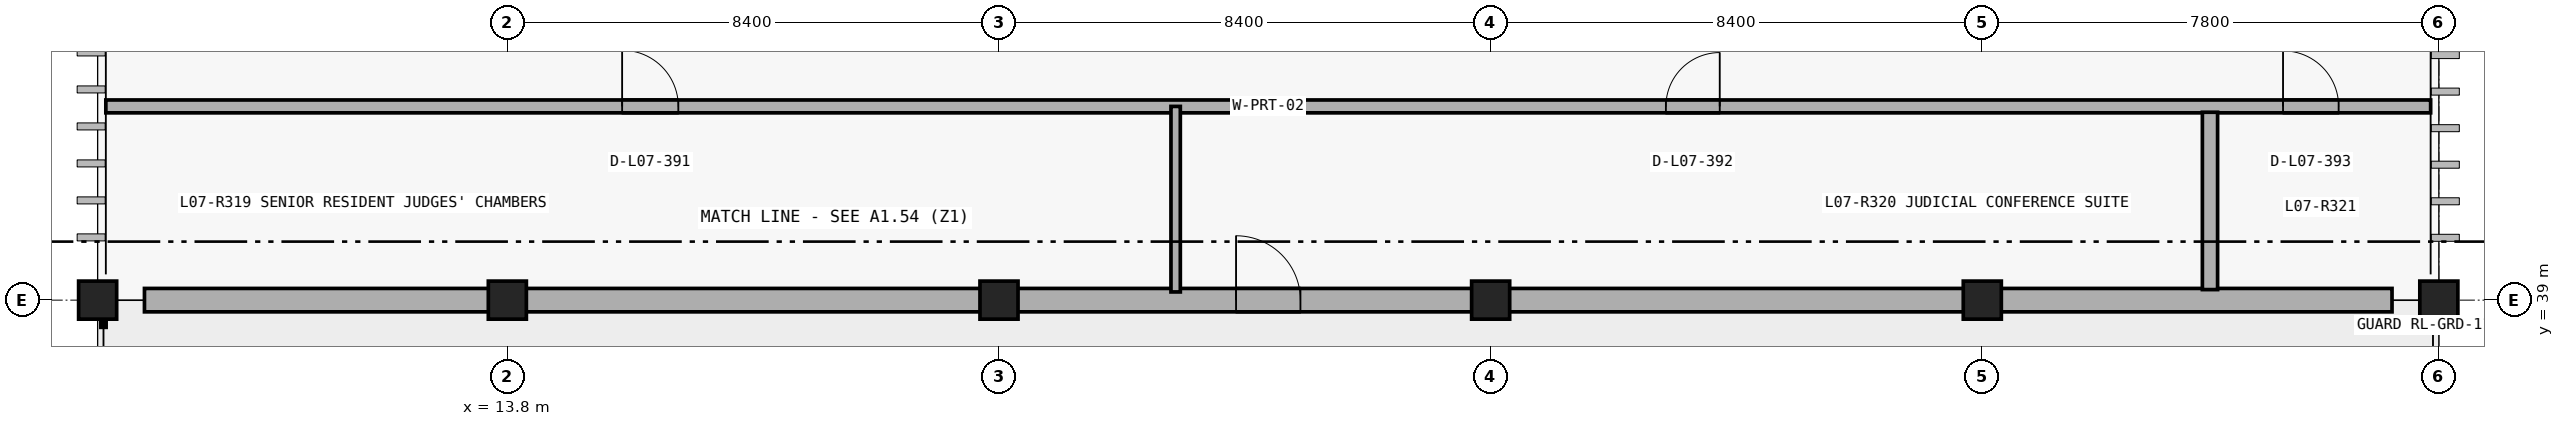
"""IFC4 building model, lengths in metres.
Left out: names, types, materials, properties, quantities, classifications, styles, units other than length and angle.
Written with IfcOpenShell. Run it as: python <this file> out.ifc"""

import sys

from ifc_helpers import new_model, si_unit, direction, frame, frame_2d, origin_with_axes, origin_2d_with_axis, place, context, subcontext, project, spatial, rectangle, circle, extrude, element, fill, save


model = new_model("IFC4")
c1 = context("Model", 3, precision=1e-05, world=origin_with_axes(), true_north=direction((0.0, 1.0)))
c2 = subcontext(c1, "Body", "Model", "MODEL_VIEW")
j1 = project(units=[si_unit("LENGTHUNIT", "METRE"), si_unit("PLANEANGLEUNIT", "RADIAN")], contexts=[c1])
p1 = place(None, origin_with_axes())
s1 = spatial("IfcSite", under=j1, at=p1, CompositionType="ELEMENT")
p2 = place(p1, origin_with_axes())
s2 = spatial("IfcBuilding", under=s1, at=p2, CompositionType="ELEMENT")
p3 = place(p2, frame((0.0, 0.0, 34.5), z_axis=(0.0, 0.0, 1.0), x_axis=(1.0, 0.0, 0.0)))
s3 = spatial("IfcBuildingStorey", under=s2, at=p3, CompositionType="ELEMENT", Elevation=34.5)
p4 = place(None, frame((7.6, 39.0, 34.5), z_axis=(0.0, 0.0, 1.0), x_axis=(1.0, 0.0, 0.0)))
e1 = element("IfcWall", 1, at=p4, inside=s3, PredefinedType="SOLIDWALL", context=c2, shape_type="SweptSolid", body=[
    extrude(rectangle(XDim=38.4, YDim=0.4, at=frame_2d((19.2, 0.0), x_axis=(1.0, 0.0))), origin_with_axes(), (0.0, 0.0, 1.0), 3.814),
])
p5 = place(None, frame((26.8, 39.0, 34.5), z_axis=(0.0, 0.0, 1.0), x_axis=(1.0, 0.0, 0.0)))
e2 = element("IfcOpeningElement", 2, at=p5, cuts=e1, PredefinedType="OPENING", context=c2, shape_type="SweptSolid", body=[
    extrude(rectangle(XDim=1.1, YDim=2.3, at=frame_2d((0.0, 1.15), x_axis=(1.0, 0.0))), frame((0.0, 0.21, 0.0), z_axis=(0.0, -1.0, 0.0), x_axis=(1.0, 0.0, 0.0)), (0.0, 0.0, 1.0), 0.42),
])
p6 = place(None, frame((6.94, 42.31, 34.5), z_axis=(0.0, 0.0, 1.0), x_axis=(1.0, 0.0, 0.0)))
e3 = element("IfcWall", 3, at=p6, inside=s3, PredefinedType="PARTITIONING", context=c2, shape_type="SweptSolid", body=[
    extrude(rectangle(XDim=39.72, YDim=0.22, at=frame_2d((19.86, 0.0), x_axis=(1.0, 0.0))), origin_with_axes(), (0.0, 0.0, 1.0), 4.14),
])
p7 = place(None, frame((16.241, 42.31, 34.5), z_axis=(0.0, 0.0, 1.0), x_axis=(1.0, 0.0, 0.0)))
e4 = element("IfcOpeningElement", 4, at=p7, cuts=e3, PredefinedType="OPENING", context=c2, shape_type="SweptSolid", body=[
    extrude(rectangle(XDim=0.96, YDim=2.2, at=frame_2d((0.0, 1.1), x_axis=(1.0, 0.0))), frame((0.0, 0.12, 0.0), z_axis=(0.0, -1.0, 0.0), x_axis=(1.0, 0.0, 0.0)), (0.0, 0.0, 1.0), 0.24),
])
p8 = place(None, frame((34.054, 42.31, 34.5), z_axis=(0.0, 0.0, 1.0), x_axis=(1.0, 0.0, 0.0)))
e5 = element("IfcOpeningElement", 5, at=p8, cuts=e3, PredefinedType="OPENING", context=c2, shape_type="SweptSolid", body=[
    extrude(rectangle(XDim=0.92, YDim=2.14, at=frame_2d((0.0, 1.07), x_axis=(1.0, 0.0))), frame((0.0, 0.12, 0.0), z_axis=(0.0, -1.0, 0.0), x_axis=(1.0, 0.0, 0.0)), (0.0, 0.0, 1.0), 0.24),
])
p9 = place(None, frame((44.613, 42.31, 34.5), z_axis=(0.0, 0.0, 1.0), x_axis=(1.0, 0.0, 0.0)))
e6 = element("IfcOpeningElement", 6, at=p9, cuts=e3, PredefinedType="OPENING", context=c2, shape_type="SweptSolid", body=[
    extrude(rectangle(XDim=0.95, YDim=2.1, at=frame_2d((0.0, 1.05), x_axis=(1.0, 0.0))), frame((0.0, 0.12, 0.0), z_axis=(0.0, -1.0, 0.0), x_axis=(1.0, 0.0, 0.0)), (0.0, 0.0, 1.0), 0.24),
])
p10 = place(None, frame((42.89, 39.18, 34.5), z_axis=(0.0, 0.0, 1.0), x_axis=(0.0, 1.0, 0.0)))
e7 = element("IfcWall", 7, at=p10, inside=s3, PredefinedType="PLUMBINGWALL", context=c2, shape_type="SweptSolid", body=[
    extrude(rectangle(XDim=3.03, YDim=0.26, at=frame_2d((1.515, 0.0), x_axis=(1.0, 0.0))), origin_with_axes(), (0.0, 0.0, 1.0), 4.14),
])
p11 = place(None, frame((25.218, 39.14, 34.5), z_axis=(0.0, 0.0, 1.0), x_axis=(0.0, 1.0, 0.0)))
e8 = element("IfcWall", 8, at=p11, inside=s3, PredefinedType="PARTITIONING", context=c2, shape_type="SweptSolid", body=[
    extrude(rectangle(XDim=3.17, YDim=0.16, at=frame_2d((1.585, 0.0), x_axis=(1.0, 0.0))), origin_with_axes(), (0.0, 0.0, 1.0), 4.14),
])
for number, where, z_axis, x_axis in (
    (9, (6.8, 39.0, 34.5), (0.0, 0.0, 1.0), (1.0, 0.0, 0.0)),
    (10, (13.8, 39.0, 34.5), (0.0, 0.0, 1.0), (1.0, 0.0, 0.0)),
    (11, (22.2, 39.0, 34.5), (0.0, 0.0, 1.0), (1.0, 0.0, 0.0)),
    (12, (30.6, 39.0, 34.5), (0.0, 0.0, 1.0), (1.0, 0.0, 0.0)),
    (13, (39.0, 39.0, 34.5), (0.0, 0.0, 1.0), (1.0, 0.0, 0.0)),
    (14, (46.8, 39.0, 34.5), (0.0, 0.0, 1.0), (1.0, 0.0, 0.0)),
):
    element("IfcColumn", number, at=place(None, frame(where, z_axis=z_axis, x_axis=x_axis)), inside=s3, PredefinedType="COLUMN", context=c2, shape_type="SweptSolid", body=[
        extrude(circle(Radius=0.325, at=origin_2d_with_axis()), origin_with_axes(), (0.0, 0.0, 1.0), 4.5),
    ])
p12 = place(None, frame((26.8, 39.0, 34.5), z_axis=(0.0, 0.0, 1.0), x_axis=(1.0, 0.0, 0.0)))
e15 = element("IfcDoor", 15, at=p12, inside=s3, OperationType="SINGLE_SWING_LEFT", PredefinedType="DOOR", context=c2, shape_type="SweptSolid", body=[
    extrude(rectangle(XDim=1.1, YDim=2.3, at=frame_2d((0.0, 1.15), x_axis=(1.0, 0.0))), frame((0.0, 0.04, 0.0), z_axis=(0.0, -1.0, 0.0), x_axis=(1.0, 0.0, 0.0)), (0.0, 0.0, 1.0), 0.08),
])
fill(e2, e15)
p13 = place(None, frame((16.241, 42.31, 34.5), z_axis=(0.0, 0.0, 1.0), x_axis=(1.0, 0.0, 0.0)))
e16 = element("IfcDoor", 16, at=p13, inside=s3, OperationType="SINGLE_SWING_LEFT", PredefinedType="DOOR", context=c2, shape_type="SweptSolid", body=[
    extrude(rectangle(XDim=0.96, YDim=2.2, at=frame_2d((0.0, 1.1), x_axis=(1.0, 0.0))), frame((0.0, 0.04, 0.0), z_axis=(0.0, -1.0, 0.0), x_axis=(1.0, 0.0, 0.0)), (0.0, 0.0, 1.0), 0.08),
])
fill(e4, e16)
p14 = place(None, frame((34.054, 42.31, 34.5), z_axis=(0.0, 0.0, 1.0), x_axis=(1.0, 0.0, 0.0)))
e17 = element("IfcDoor", 17, at=p14, inside=s3, OperationType="SINGLE_SWING_RIGHT", PredefinedType="DOOR", context=c2, shape_type="SweptSolid", body=[
    extrude(rectangle(XDim=0.92, YDim=2.14, at=frame_2d((0.0, 1.07), x_axis=(1.0, 0.0))), frame((0.0, 0.04, 0.0), z_axis=(0.0, -1.0, 0.0), x_axis=(1.0, 0.0, 0.0)), (0.0, 0.0, 1.0), 0.08),
])
fill(e5, e17)
p15 = place(None, frame((44.613, 42.31, 34.5), z_axis=(0.0, 0.0, 1.0), x_axis=(1.0, 0.0, 0.0)))
e18 = element("IfcDoor", 18, at=p15, inside=s3, OperationType="SINGLE_SWING_LEFT", PredefinedType="DOOR", context=c2, shape_type="SweptSolid", body=[
    extrude(rectangle(XDim=0.95, YDim=2.1, at=frame_2d((0.0, 1.05), x_axis=(1.0, 0.0))), frame((0.0, 0.04, 0.0), z_axis=(0.0, -1.0, 0.0), x_axis=(1.0, 0.0, 0.0)), (0.0, 0.0, 1.0), 0.08),
])
fill(e6, e18)
save(model, sys.argv[1])
